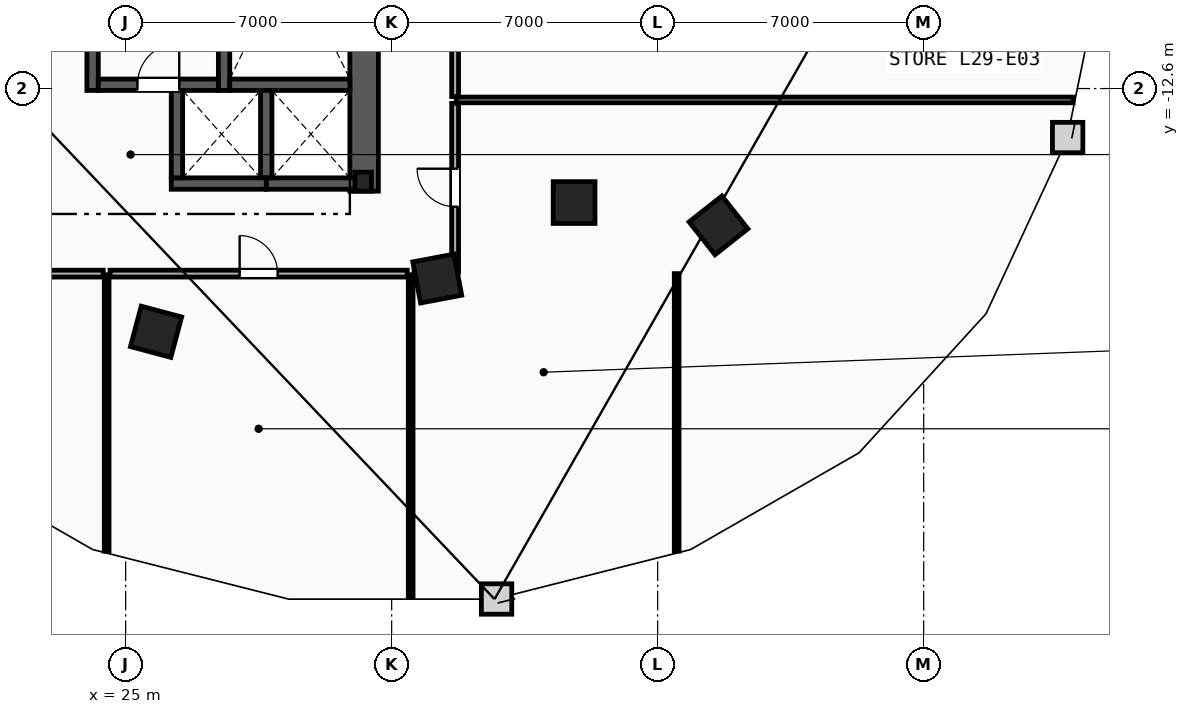
"""IFC4 building model, lengths in metres.
Left out: names, types, materials, properties, quantities, classifications, styles, units other than length and angle.
Written with IfcOpenShell. Run it as: python <this file> out.ifc"""

import sys

from ifc_helpers import new_model, si_unit, direction, frame, frame_2d, origin, origin_2d, place, context, subcontext, project, spatial, rectangle, i_section, extrude, element, fill, save


model = new_model("IFC4")
c1 = context("Model", 3, precision=1e-05, world=origin(), true_north=direction((0.0, 1.0)))
c2 = subcontext(c1, "Body", "Model", "MODEL_VIEW")
j1 = project(units=[si_unit("LENGTHUNIT", "METRE"), si_unit("PLANEANGLEUNIT", "RADIAN")], contexts=[c1])
p1 = place(None, origin())
s1 = spatial("IfcSite", under=j1, at=p1, CompositionType="ELEMENT")
p2 = place(p1, origin())
s2 = spatial("IfcBuilding", under=s1, at=p2, CompositionType="ELEMENT")
p3 = place(p2, frame((0.0, 0.0, 114.2)))
s3 = spatial("IfcBuildingStorey", under=s2, at=p3, CompositionType="ELEMENT", Elevation=114.2)
p4 = place(p3, frame((31.25, -15.05, 0.0), z_axis=(0.0, 0.0, 1.0), x_axis=(1.0, 0.0, 0.0)))
e1 = element("IfcColumn", 1, at=p4, inside=s3, PredefinedType="COLUMN", context=c2, shape_type="SweptSolid", body=[
    extrude(i_section(OverallWidth=0.432, OverallDepth=0.498, WebThickness=0.056, FlangeThickness=0.089, FilletRadius=0.018, at=origin_2d()), origin(), (0.0, 0.0, 1.0), 3.6),
])
for number, where, z_axis, x_axis in (
    (2, (36.8, -15.6, 0.0), (0.0, 0.0, 1.0), (1.0, 0.0, 0.0)),
    (3, (25.8, -19.0, 0.0), (0.0, 0.0, 1.0), (0.966, -0.259, 0.0)),
    (4, (33.2, -17.6, 0.0), (0.0, 0.0, 1.0), (0.983, 0.186, 0.0)),
    (5, (40.6, -16.2, 0.0), (0.0, 0.0, 1.0), (0.785, 0.619, 0.0)),
):
    element("IfcColumn", number, at=place(p3, frame(where, z_axis=z_axis, x_axis=x_axis)), inside=s3, PredefinedType="COLUMN", context=c2, shape_type="SweptSolid", body=[
        extrude(rectangle(XDim=1.1, YDim=1.1, at=origin_2d()), origin(), (0.0, 0.0, 1.0), 3.6),
    ])
p5 = place(p3, frame((31.275, -15.3, 0.0), z_axis=(0.0, 0.0, 1.0), x_axis=(0.0, 1.0, 0.0)))
e6 = element("IfcWall", 6, at=p5, inside=s3, PredefinedType="SHEAR", context=c2, shape_type="SweptSolid", body=[
    extrude(rectangle(XDim=13.33, YDim=0.75, at=frame_2d((6.665, 0.0))), origin(), (0.0, 0.0, 1.0), 3.3),
])
for number, where, z_axis, x_axis in (
    (7, (27.59, -12.65, 0.0), (0.0, 0.0, 1.0), (0.0, 1.0, 0.0)),
    (8, (24.13, -12.65, 0.0), (0.0, 0.0, 1.0), (0.0, 1.0, 0.0)),
):
    element("IfcWall", number, at=place(p3, frame(where, z_axis=z_axis, x_axis=x_axis)), inside=s3, PredefinedType="SHEAR", context=c2, shape_type="SweptSolid", body=[
        extrude(rectangle(XDim=10.68, YDim=0.3, at=frame_2d((5.34, 0.0))), origin(), (0.0, 0.0, 1.0), 3.3),
    ])
p6 = place(p3, frame((27.74, -12.5, 0.0), z_axis=(0.0, 0.0, 1.0), x_axis=(1.0, 0.0, 0.0)))
e9 = element("IfcWall", 9, at=p6, inside=s3, PredefinedType="SHEAR", context=c2, shape_type="SweptSolid", body=[
    extrude(rectangle(XDim=3.16, YDim=0.3, at=frame_2d((1.58, 0.0))), origin(), (0.0, 0.0, 1.0), 3.3),
])
p7 = place(p3, frame((24.28, -12.5, 0.0), z_axis=(0.0, 0.0, 1.0), x_axis=(1.0, 0.0, 0.0)))
e10 = element("IfcWall", 10, at=p7, inside=s3, PredefinedType="SHEAR", context=c2, shape_type="SweptSolid", body=[
    extrude(rectangle(XDim=3.16, YDim=0.3, at=frame_2d((1.58, 0.0))), origin(), (0.0, 0.0, 1.0), 3.3),
])
p8 = place(p7, frame((1.03, 0.0, 0.0)))
e11 = element("IfcOpeningElement", 11, at=p8, cuts=e10, PredefinedType="OPENING", context=c2, shape_type="SweptSolid", body=[
    extrude(rectangle(XDim=1.1, YDim=2.15, at=frame_2d((0.55, 1.075))), frame((0.0, 0.16, 0.0), z_axis=(0.0, -1.0, 0.0), x_axis=(1.0, 0.0, 0.0)), (0.0, 0.0, 1.0), 0.32),
])
p9 = place(p3, frame((28.7, -15.1, 0.0), z_axis=(0.0, 0.0, 1.0), x_axis=(1.0, 0.0, 0.0)))
e12 = element("IfcWall", 12, at=p9, inside=s3, PredefinedType="SHEAR", context=c2, shape_type="SweptSolid", body=[
    extrude(rectangle(XDim=2.5, YDim=0.3, at=frame_2d((1.25, 0.0))), origin(), (0.0, 0.0, 1.0), 3.3),
])
p10 = place(p3, frame((28.7, -14.95, 0.0), z_axis=(0.0, 0.0, 1.0), x_axis=(0.0, 1.0, 0.0)))
e13 = element("IfcWall", 13, at=p10, inside=s3, PredefinedType="SHEAR", context=c2, shape_type="SweptSolid", body=[
    extrude(rectangle(XDim=2.3, YDim=0.3, at=frame_2d((1.15, 0.0))), origin(), (0.0, 0.0, 1.0), 3.3),
])
p11 = place(p3, frame((26.2, -15.1, 0.0), z_axis=(0.0, 0.0, 1.0), x_axis=(1.0, 0.0, 0.0)))
e14 = element("IfcWall", 14, at=p11, inside=s3, PredefinedType="SHEAR", context=c2, shape_type="SweptSolid", body=[
    extrude(rectangle(XDim=2.5, YDim=0.3, at=frame_2d((1.25, 0.0))), origin(), (0.0, 0.0, 1.0), 3.3),
])
p12 = place(p3, frame((26.35, -14.95, 0.0), z_axis=(0.0, 0.0, 1.0), x_axis=(0.0, 1.0, 0.0)))
e15 = element("IfcWall", 15, at=p12, inside=s3, PredefinedType="SHEAR", context=c2, shape_type="SweptSolid", body=[
    extrude(rectangle(XDim=2.3, YDim=0.3, at=frame_2d((1.15, 0.0))), origin(), (0.0, 0.0, 1.0), 3.3),
])
p13 = place(p3, frame((33.7, -12.9, 0.0), z_axis=(0.0, 0.0, 1.0), x_axis=(1.0, 0.0, 0.0)))
e16 = element("IfcWall", 16, at=p13, inside=s3, PredefinedType="PARTITIONING", context=c2, shape_type="SweptSolid", body=[
    extrude(rectangle(XDim=16.231, YDim=0.15, at=frame_2d((8.115, 0.0))), origin(), (0.0, 0.0, 1.0), 3.3),
])
p14 = place(p3, frame((24.5, -24.772, 0.0), z_axis=(0.0, 0.0, 1.0), x_axis=(0.0, 1.0, 0.0)))
e17 = element("IfcWall", 17, at=p14, inside=s3, PredefinedType="PARTITIONING", context=c2, shape_type="SweptSolid", body=[
    extrude(rectangle(XDim=7.272, YDim=0.125, at=frame_2d((3.636, 0.0))), origin(), (0.0, 0.0, 1.0), 3.3),
])
p15 = place(p3, frame((32.5, -25.985, 0.0), z_axis=(0.0, 0.0, 1.0), x_axis=(0.0, 1.0, 0.0)))
e18 = element("IfcWall", 18, at=p15, inside=s3, PredefinedType="PARTITIONING", context=c2, shape_type="SweptSolid", body=[
    extrude(rectangle(XDim=8.485, YDim=0.125, at=frame_2d((4.243, 0.0))), origin(), (0.0, 0.0, 1.0), 3.3),
])
p16 = place(p3, frame((39.5, -24.772, 0.0), z_axis=(0.0, 0.0, 1.0), x_axis=(0.0, 1.0, 0.0)))
e19 = element("IfcWall", 19, at=p16, inside=s3, PredefinedType="PARTITIONING", context=c2, shape_type="SweptSolid", body=[
    extrude(rectangle(XDim=7.302, YDim=0.125, at=frame_2d((3.651, 0.0))), origin(), (0.0, 0.0, 1.0), 3.3),
])
p17 = place(p3, frame((24.59, -17.47, 0.0), z_axis=(0.0, 0.0, 1.0), x_axis=(1.0, 0.0, 0.0)))
e20 = element("IfcWall", 20, at=p17, inside=s3, PredefinedType="PARTITIONING", context=c2, shape_type="SweptSolid", body=[
    extrude(rectangle(XDim=7.82, YDim=0.18, at=frame_2d((3.91, 0.0))), origin(), (0.0, 0.0, 1.0), 3.3),
])
p18 = place(p17, frame((3.41, 0.0, 0.0)))
e21 = element("IfcOpeningElement", 21, at=p18, cuts=e20, PredefinedType="OPENING", context=c2, shape_type="SweptSolid", body=[
    extrude(rectangle(XDim=1.0, YDim=2.15, at=frame_2d((0.5, 1.075))), frame((0.0, 0.1, 0.0), z_axis=(0.0, -1.0, 0.0), x_axis=(1.0, 0.0, 0.0)), (0.0, 0.0, 1.0), 0.2),
])
p19 = place(p3, frame((33.67, -17.428, 0.0), z_axis=(0.0, 0.0, 1.0), x_axis=(0.0, 1.0, 0.0)))
e22 = element("IfcWall", 22, at=p19, inside=s3, PredefinedType="PARTITIONING", context=c2, shape_type="SweptSolid", body=[
    extrude(rectangle(XDim=4.438, YDim=0.18, at=frame_2d((2.219, 0.0))), origin(), (0.0, 0.0, 1.0), 3.3),
])
p20 = place(p19, frame((1.719, 0.0, 0.0)))
e23 = element("IfcOpeningElement", 23, at=p20, cuts=e22, PredefinedType="OPENING", context=c2, shape_type="SweptSolid", body=[
    extrude(rectangle(XDim=1.0, YDim=2.15, at=frame_2d((0.5, 1.075))), frame((0.0, 0.1, 0.0), z_axis=(0.0, -1.0, 0.0), x_axis=(1.0, 0.0, 0.0)), (0.0, 0.0, 1.0), 0.2),
])
p21 = place(p3, frame((32.59, -17.47, 0.0), z_axis=(0.0, 0.0, 1.0), x_axis=(1.0, 0.0, 0.0)))
e24 = element("IfcWall", 24, at=p21, inside=s3, PredefinedType="PARTITIONING", context=c2, shape_type="SweptSolid", body=[
    extrude(rectangle(XDim=1.038, YDim=0.18, at=frame_2d((0.519, 0.0))), origin(), (0.0, 0.0, 1.0), 3.3),
])
p22 = place(p3, frame((33.67, -12.81, 0.0), z_axis=(0.0, 0.0, 1.0), x_axis=(0.0, 1.0, 0.0)))
e25 = element("IfcWall", 25, at=p22, inside=s3, PredefinedType="PARTITIONING", context=c2, shape_type="SweptSolid", body=[
    extrude(rectangle(XDim=3.459, YDim=0.18, at=frame_2d((1.729, 0.0))), origin(), (0.0, 0.0, 1.0), 3.3),
])
p23 = place(p22, frame((1.229, 0.0, 0.0)))
e26 = element("IfcOpeningElement", 26, at=p23, cuts=e25, PredefinedType="OPENING", context=c2, shape_type="SweptSolid", body=[
    extrude(rectangle(XDim=1.0, YDim=2.15, at=frame_2d((0.5, 1.075))), frame((0.0, 0.1, 0.0), z_axis=(0.0, -1.0, 0.0), x_axis=(1.0, 0.0, 0.0)), (0.0, 0.0, 1.0), 0.2),
])
p24 = place(p3, frame((16.822, -17.47, 0.0), z_axis=(0.0, 0.0, 1.0), x_axis=(1.0, 0.0, 0.0)))
e27 = element("IfcWall", 27, at=p24, inside=s3, PredefinedType="PARTITIONING", context=c2, shape_type="SweptSolid", body=[
    extrude(rectangle(XDim=7.588, YDim=0.18, at=frame_2d((3.794, 0.0))), origin(), (0.0, 0.0, 1.0), 3.3),
])
p25 = place(p8, origin())
e28 = element("IfcDoor", 28, at=p25, inside=s3, OperationType="SINGLE_SWING_RIGHT", PredefinedType="DOOR", context=c2, shape_type="SweptSolid", body=[
    extrude(rectangle(XDim=1.1, YDim=2.15, at=frame_2d((0.55, 1.075))), frame((0.0, 0.025, 0.0), z_axis=(0.0, -1.0, 0.0), x_axis=(1.0, 0.0, 0.0)), (0.0, 0.0, 1.0), 0.05),
])
fill(e11, e28)
p26 = place(p18, origin())
e29 = element("IfcDoor", 29, at=p26, inside=s3, OperationType="SINGLE_SWING_LEFT", PredefinedType="DOOR", context=c2, shape_type="SweptSolid", body=[
    extrude(rectangle(XDim=1.0, YDim=2.15, at=frame_2d((0.5, 1.075))), frame((0.0, 0.025, 0.0), z_axis=(0.0, -1.0, 0.0), x_axis=(1.0, 0.0, 0.0)), (0.0, 0.0, 1.0), 0.05),
])
fill(e21, e29)
p27 = place(p20, origin())
e30 = element("IfcDoor", 30, at=p27, inside=s3, OperationType="SINGLE_SWING_RIGHT", PredefinedType="DOOR", context=c2, shape_type="SweptSolid", body=[
    extrude(rectangle(XDim=1.0, YDim=2.15, at=frame_2d((0.5, 1.075))), frame((0.0, 0.025, 0.0), z_axis=(0.0, -1.0, 0.0), x_axis=(1.0, 0.0, 0.0)), (0.0, 0.0, 1.0), 0.05),
])
fill(e23, e30)
save(model, sys.argv[1])
